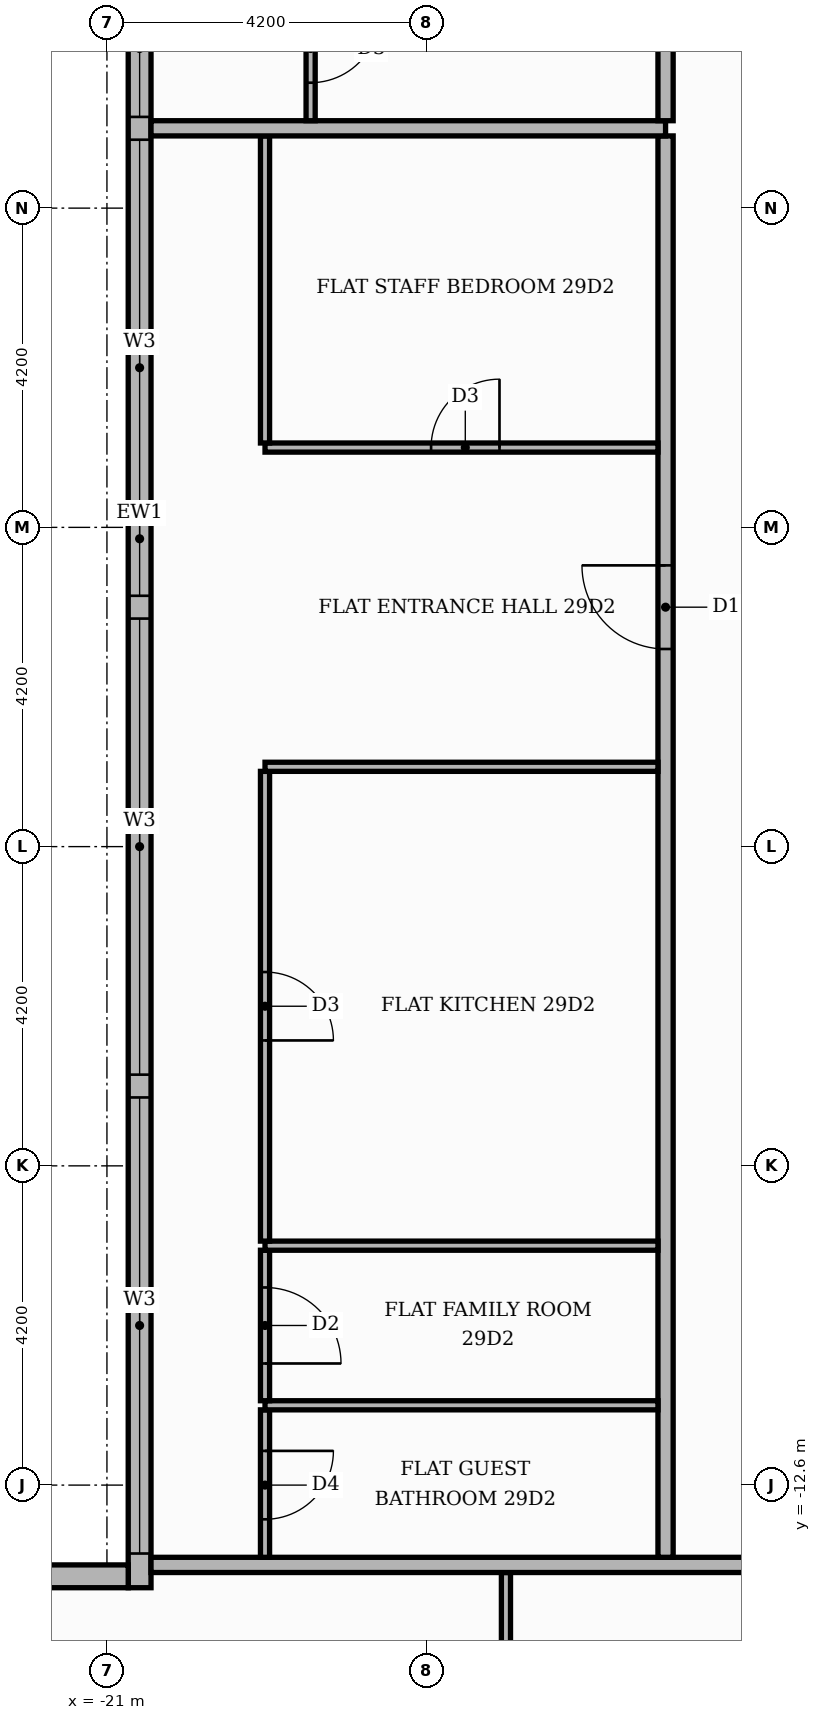
"""IFC4 building model, lengths in metres.
Left out: names, types, materials, properties, quantities, classifications, styles, units other than length and angle.
Written with IfcOpenShell. Run it as: python <this file> out.ifc"""

import sys

from ifc_helpers import new_model, si_unit, direction, frame, frame_2d, origin, place, context, subcontext, project, spatial, rectangle, extrude, element, fill, save


model = new_model("IFC4")
c1 = context("Model", 3, precision=1e-05, world=origin(), true_north=direction((0.0, 1.0)))
c2 = subcontext(c1, "Body", "Model", "MODEL_VIEW")
j1 = project(units=[si_unit("LENGTHUNIT", "METRE"), si_unit("PLANEANGLEUNIT", "RADIAN")], contexts=[c1])
p1 = place(None, origin())
s1 = spatial("IfcSite", under=j1, at=p1, CompositionType="ELEMENT")
p2 = place(p1, origin())
s2 = spatial("IfcBuilding", under=s1, at=p2, CompositionType="ELEMENT")
p3 = place(p2, frame((0.0, 0.0, 122.1)))
s3 = spatial("IfcBuildingStorey", under=s2, at=p3, CompositionType="ELEMENT", Elevation=122.1)
p4 = place(p3, frame((-20.57, 13.65, 0.0), z_axis=(0.0, 0.0, 1.0), x_axis=(0.0, -1.0, 0.0)))
e1 = element("IfcWall", 1, at=p4, inside=s3, PredefinedType="STANDARD", context=c2, shape_type="SweptSolid", body=[
    extrude(rectangle(XDim=27.6, YDim=0.3, at=frame_2d((13.8, 0.0))), origin(), (0.0, 0.0, 1.0), 3.4),
])
p5 = place(p4, frame((0.15, 0.0, 0.9)))
e2 = element("IfcOpeningElement", 2, at=p5, cuts=e1, PredefinedType="OPENING", context=c2, shape_type="SweptSolid", body=[
    extrude(rectangle(XDim=6.0, YDim=2.1, at=frame_2d((3.0, 1.05))), frame((0.0, 0.16, 0.0), z_axis=(0.0, -1.0, 0.0), x_axis=(1.0, 0.0, 0.0)), (0.0, 0.0, 1.0), 0.32),
])
p6 = place(p4, frame((6.45, 0.0, 0.9)))
e3 = element("IfcOpeningElement", 3, at=p6, cuts=e1, PredefinedType="OPENING", context=c2, shape_type="SweptSolid", body=[
    extrude(rectangle(XDim=1.8, YDim=2.1, at=frame_2d((0.9, 1.05))), frame((0.0, 0.16, 0.0), z_axis=(0.0, -1.0, 0.0), x_axis=(1.0, 0.0, 0.0)), (0.0, 0.0, 1.0), 0.32),
])
p7 = place(p4, frame((8.55, 0.0, 0.9)))
e4 = element("IfcOpeningElement", 4, at=p7, cuts=e1, PredefinedType="OPENING", context=c2, shape_type="SweptSolid", body=[
    extrude(rectangle(XDim=6.0, YDim=2.1, at=frame_2d((3.0, 1.05))), frame((0.0, 0.16, 0.0), z_axis=(0.0, -1.0, 0.0), x_axis=(1.0, 0.0, 0.0)), (0.0, 0.0, 1.0), 0.32),
])
p8 = place(p4, frame((14.85, 0.0, 0.9)))
e5 = element("IfcOpeningElement", 5, at=p8, cuts=e1, PredefinedType="OPENING", context=c2, shape_type="SweptSolid", body=[
    extrude(rectangle(XDim=6.0, YDim=2.1, at=frame_2d((3.0, 1.05))), frame((0.0, 0.16, 0.0), z_axis=(0.0, -1.0, 0.0), x_axis=(1.0, 0.0, 0.0)), (0.0, 0.0, 1.0), 0.32),
])
p9 = place(p4, frame((21.15, 0.0, 0.9)))
e6 = element("IfcOpeningElement", 6, at=p9, cuts=e1, PredefinedType="OPENING", context=c2, shape_type="SweptSolid", body=[
    extrude(rectangle(XDim=6.0, YDim=2.1, at=frame_2d((3.0, 1.05))), frame((0.0, 0.16, 0.0), z_axis=(0.0, -1.0, 0.0), x_axis=(1.0, 0.0, 0.0)), (0.0, 0.0, 1.0), 0.32),
])
p10 = place(p3, frame((-20.72, -13.8, 0.0), z_axis=(0.0, 0.0, 1.0), x_axis=(-1.0, 0.0, 0.0)))
e7 = element("IfcWall", 7, at=p10, inside=s3, PredefinedType="STANDARD", context=c2, shape_type="SweptSolid", body=[
    extrude(rectangle(XDim=5.0, YDim=0.3, at=frame_2d((2.5, 0.0))), origin(), (0.0, 0.0, 1.0), 3.4),
])
p11 = place(p10, frame((1.48, 0.0, 0.9)))
e8 = element("IfcOpeningElement", 8, at=p11, cuts=e7, PredefinedType="OPENING", context=c2, shape_type="SweptSolid", body=[
    extrude(rectangle(XDim=1.8, YDim=2.1, at=frame_2d((0.9, 1.05))), frame((0.0, 0.16, 0.0), z_axis=(0.0, -1.0, 0.0), x_axis=(1.0, 0.0, 0.0)), (0.0, 0.0, 1.0), 0.32),
])
p12 = place(p3, frame((-15.75, -20.66, 0.0), z_axis=(0.0, 0.0, 1.0), x_axis=(0.0, 1.0, 0.0)))
e9 = element("IfcWall", 9, at=p12, inside=s3, PredefinedType="PARTITIONING", context=c2, shape_type="SweptSolid", body=[
    extrude(rectangle(XDim=6.91, YDim=0.12, at=frame_2d((3.455, 0.0))), origin(), (0.0, 0.0, 1.0), 3.4),
])
p13 = place(p12, frame((2.975, 0.0, 0.0)))
e10 = element("IfcOpeningElement", 10, at=p13, cuts=e9, PredefinedType="OPENING", context=c2, shape_type="SweptSolid", body=[
    extrude(rectangle(XDim=1.0, YDim=2.1, at=frame_2d((0.5, 1.05))), frame((0.0, 0.07, 0.0), z_axis=(0.0, -1.0, 0.0), x_axis=(1.0, 0.0, 0.0)), (0.0, 0.0, 1.0), 0.14),
])
p14 = place(p3, frame((-20.42, -13.65, 0.0), z_axis=(0.0, 0.0, 1.0), x_axis=(1.0, 0.0, 0.0)))
e11 = element("IfcWall", 11, at=p14, inside=s3, PredefinedType="PARTITIONING", context=c2, shape_type="SweptSolid", body=[
    extrude(rectangle(XDim=34.07, YDim=0.2, at=frame_2d((17.035, 0.0))), origin(), (0.0, 0.0, 1.0), 3.4),
])
p15 = place(p14, frame((8.32, 0.0, 0.0)))
e12 = element("IfcOpeningElement", 12, at=p15, cuts=e11, PredefinedType="OPENING", context=c2, shape_type="SweptSolid", body=[
    extrude(rectangle(XDim=1.1, YDim=2.4, at=frame_2d((0.55, 1.2))), frame((0.0, 0.11, 0.0), z_axis=(0.0, -1.0, 0.0), x_axis=(1.0, 0.0, 0.0)), (0.0, 0.0, 1.0), 0.22),
])
p16 = place(p14, frame((16.72, 0.0, 0.0)))
e13 = element("IfcOpeningElement", 13, at=p16, cuts=e11, PredefinedType="OPENING", context=c2, shape_type="SweptSolid", body=[
    extrude(rectangle(XDim=1.1, YDim=2.4, at=frame_2d((0.55, 1.2))), frame((0.0, 0.11, 0.0), z_axis=(0.0, -1.0, 0.0), x_axis=(1.0, 0.0, 0.0)), (0.0, 0.0, 1.0), 0.22),
])
p17 = place(p3, frame((-18.92, -13.55, 0.0), z_axis=(0.0, 0.0, 1.0), x_axis=(0.0, 1.0, 0.0)))
e14 = element("IfcWall", 14, at=p17, inside=s3, PredefinedType="PARTITIONING", context=c2, shape_type="SweptSolid", body=[
    extrude(rectangle(XDim=1.94, YDim=0.12, at=frame_2d((0.97, 0.0))), origin(), (0.0, 0.0, 1.0), 3.4),
])
p18 = place(p17, frame((0.5, 0.0, 0.0)))
e15 = element("IfcOpeningElement", 15, at=p18, cuts=e14, PredefinedType="OPENING", context=c2, shape_type="SweptSolid", body=[
    extrude(rectangle(XDim=0.9, YDim=2.1, at=frame_2d((0.45, 1.05))), frame((0.0, 0.07, 0.0), z_axis=(0.0, -1.0, 0.0), x_axis=(1.0, 0.0, 0.0)), (0.0, 0.0, 1.0), 0.14),
])
p19 = place(p3, frame((-13.65, -13.55, 0.0), z_axis=(0.0, 0.0, 1.0), x_axis=(0.0, 1.0, 0.0)))
e16 = element("IfcWall", 16, at=p19, inside=s3, PredefinedType="PARTITIONING", context=c2, shape_type="SweptSolid", body=[
    extrude(rectangle(XDim=18.7, YDim=0.2, at=frame_2d((9.35, 0.0))), origin(), (0.0, 0.0, 1.0), 3.4),
])
p20 = place(p19, frame((11.95, 0.0, 0.0)))
e17 = element("IfcOpeningElement", 17, at=p20, cuts=e16, PredefinedType="OPENING", context=c2, shape_type="SweptSolid", body=[
    extrude(rectangle(XDim=1.1, YDim=2.4, at=frame_2d((0.55, 1.2))), frame((0.0, 0.11, 0.0), z_axis=(0.0, -1.0, 0.0), x_axis=(1.0, 0.0, 0.0)), (0.0, 0.0, 1.0), 0.22),
])
p21 = place(p3, frame((-18.92, -11.55, 0.0), z_axis=(0.0, 0.0, 1.0), x_axis=(1.0, 0.0, 0.0)))
e18 = element("IfcWall", 18, at=p21, inside=s3, PredefinedType="PARTITIONING", context=c2, shape_type="SweptSolid", body=[
    extrude(rectangle(XDim=5.17, YDim=0.12, at=frame_2d((2.585, 0.0))), origin(), (0.0, 0.0, 1.0), 3.4),
])
p22 = place(p3, frame((-18.92, -11.49, 0.0), z_axis=(0.0, 0.0, 1.0), x_axis=(0.0, 1.0, 0.0)))
e19 = element("IfcWall", 19, at=p22, inside=s3, PredefinedType="PARTITIONING", context=c2, shape_type="SweptSolid", body=[
    extrude(rectangle(XDim=1.98, YDim=0.12, at=frame_2d((0.99, 0.0))), origin(), (0.0, 0.0, 1.0), 3.4),
])
p23 = place(p22, frame((0.49, 0.0, 0.0)))
e20 = element("IfcOpeningElement", 20, at=p23, cuts=e19, PredefinedType="OPENING", context=c2, shape_type="SweptSolid", body=[
    extrude(rectangle(XDim=1.0, YDim=2.1, at=frame_2d((0.5, 1.05))), frame((0.0, 0.07, 0.0), z_axis=(0.0, -1.0, 0.0), x_axis=(1.0, 0.0, 0.0)), (0.0, 0.0, 1.0), 0.14),
])
p24 = place(p3, frame((-18.92, -9.45, 0.0), z_axis=(0.0, 0.0, 1.0), x_axis=(1.0, 0.0, 0.0)))
e21 = element("IfcWall", 21, at=p24, inside=s3, PredefinedType="PARTITIONING", context=c2, shape_type="SweptSolid", body=[
    extrude(rectangle(XDim=5.17, YDim=0.12, at=frame_2d((2.585, 0.0))), origin(), (0.0, 0.0, 1.0), 3.4),
])
p25 = place(p3, frame((-18.92, -9.39, 0.0), z_axis=(0.0, 0.0, 1.0), x_axis=(0.0, 1.0, 0.0)))
e22 = element("IfcWall", 22, at=p25, inside=s3, PredefinedType="PARTITIONING", context=c2, shape_type="SweptSolid", body=[
    extrude(rectangle(XDim=6.18, YDim=0.12, at=frame_2d((3.09, 0.0))), origin(), (0.0, 0.0, 1.0), 3.4),
])
p26 = place(p25, frame((2.64, 0.0, 0.0)))
e23 = element("IfcOpeningElement", 23, at=p26, cuts=e22, PredefinedType="OPENING", context=c2, shape_type="SweptSolid", body=[
    extrude(rectangle(XDim=0.9, YDim=2.1, at=frame_2d((0.45, 1.05))), frame((0.0, 0.07, 0.0), z_axis=(0.0, -1.0, 0.0), x_axis=(1.0, 0.0, 0.0)), (0.0, 0.0, 1.0), 0.14),
])
p27 = place(p3, frame((-18.92, -3.15, 0.0), z_axis=(0.0, 0.0, 1.0), x_axis=(1.0, 0.0, 0.0)))
e24 = element("IfcWall", 24, at=p27, inside=s3, PredefinedType="PARTITIONING", context=c2, shape_type="SweptSolid", body=[
    extrude(rectangle(XDim=5.17, YDim=0.12, at=frame_2d((2.585, 0.0))), origin(), (0.0, 0.0, 1.0), 3.4),
])
p28 = place(p3, frame((-18.92, 1.05, 0.0), z_axis=(0.0, 0.0, 1.0), x_axis=(1.0, 0.0, 0.0)))
e25 = element("IfcWall", 25, at=p28, inside=s3, PredefinedType="PARTITIONING", context=c2, shape_type="SweptSolid", body=[
    extrude(rectangle(XDim=5.17, YDim=0.12, at=frame_2d((2.585, 0.0))), origin(), (0.0, 0.0, 1.0), 3.4),
])
p29 = place(p28, frame((2.185, 0.0, 0.0)))
e26 = element("IfcOpeningElement", 26, at=p29, cuts=e25, PredefinedType="OPENING", context=c2, shape_type="SweptSolid", body=[
    extrude(rectangle(XDim=0.9, YDim=2.1, at=frame_2d((0.45, 1.05))), frame((0.0, 0.07, 0.0), z_axis=(0.0, -1.0, 0.0), x_axis=(1.0, 0.0, 0.0)), (0.0, 0.0, 1.0), 0.14),
])
p30 = place(p3, frame((-18.92, 1.11, 0.0), z_axis=(0.0, 0.0, 1.0), x_axis=(0.0, 1.0, 0.0)))
e27 = element("IfcWall", 27, at=p30, inside=s3, PredefinedType="PARTITIONING", context=c2, shape_type="SweptSolid", body=[
    extrude(rectangle(XDim=4.04, YDim=0.12, at=frame_2d((2.02, 0.0))), origin(), (0.0, 0.0, 1.0), 3.4),
])
p31 = place(p3, frame((-20.42, 5.25, 0.0), z_axis=(0.0, 0.0, 1.0), x_axis=(1.0, 0.0, 0.0)))
e28 = element("IfcWall", 28, at=p31, inside=s3, PredefinedType="PARTITIONING", context=c2, shape_type="SweptSolid", body=[
    extrude(rectangle(XDim=6.77, YDim=0.2, at=frame_2d((3.385, 0.0))), origin(), (0.0, 0.0, 1.0), 3.4),
])
p32 = place(p3, frame((-18.32, 5.35, 0.0), z_axis=(0.0, 0.0, 1.0), x_axis=(0.0, 1.0, 0.0)))
e29 = element("IfcWall", 29, at=p32, inside=s3, PredefinedType="PARTITIONING", context=c2, shape_type="SweptSolid", body=[
    extrude(rectangle(XDim=1.94, YDim=0.12, at=frame_2d((0.97, 0.0))), origin(), (0.0, 0.0, 1.0), 3.4),
])
p33 = place(p32, frame((0.5, 0.0, 0.0)))
e30 = element("IfcOpeningElement", 30, at=p33, cuts=e29, PredefinedType="OPENING", context=c2, shape_type="SweptSolid", body=[
    extrude(rectangle(XDim=0.9, YDim=2.1, at=frame_2d((0.45, 1.05))), frame((0.0, 0.07, 0.0), z_axis=(0.0, -1.0, 0.0), x_axis=(1.0, 0.0, 0.0)), (0.0, 0.0, 1.0), 0.14),
])
p34 = place(p3, frame((-13.65, 5.35, 0.0), z_axis=(0.0, 0.0, 1.0), x_axis=(0.0, 1.0, 0.0)))
e31 = element("IfcWall", 31, at=p34, inside=s3, PredefinedType="PARTITIONING", context=c2, shape_type="SweptSolid", body=[
    extrude(rectangle(XDim=8.2, YDim=0.2, at=frame_2d((4.1, 0.0))), origin(), (0.0, 0.0, 1.0), 3.4),
])
p35 = place(p34, frame((5.65, 0.0, 0.0)))
e32 = element("IfcOpeningElement", 32, at=p35, cuts=e31, PredefinedType="OPENING", context=c2, shape_type="SweptSolid", body=[
    extrude(rectangle(XDim=1.1, YDim=2.4, at=frame_2d((0.55, 1.2))), frame((0.0, 0.11, 0.0), z_axis=(0.0, -1.0, 0.0), x_axis=(1.0, 0.0, 0.0)), (0.0, 0.0, 1.0), 0.22),
])
p36 = place(p6, origin())
e33 = element("IfcWindow", 33, at=p36, inside=s3, PartitioningType="SINGLE_PANEL", PredefinedType="WINDOW", context=c2, shape_type="SweptSolid", body=[
    extrude(rectangle(XDim=1.8, YDim=2.1, at=frame_2d((0.9, 1.05))), frame((0.0, 0.03, 0.0), z_axis=(0.0, -1.0, 0.0), x_axis=(1.0, 0.0, 0.0)), (0.0, 0.0, 1.0), 0.06),
])
fill(e3, e33)
p37 = place(p7, origin())
e34 = element("IfcWindow", 34, at=p37, inside=s3, PartitioningType="SINGLE_PANEL", PredefinedType="WINDOW", context=c2, shape_type="SweptSolid", body=[
    extrude(rectangle(XDim=6.0, YDim=2.1, at=frame_2d((3.0, 1.05))), frame((0.0, 0.03, 0.0), z_axis=(0.0, -1.0, 0.0), x_axis=(1.0, 0.0, 0.0)), (0.0, 0.0, 1.0), 0.06),
])
fill(e4, e34)
p38 = place(p8, origin())
e35 = element("IfcWindow", 35, at=p38, inside=s3, PartitioningType="SINGLE_PANEL", PredefinedType="WINDOW", context=c2, shape_type="SweptSolid", body=[
    extrude(rectangle(XDim=6.0, YDim=2.1, at=frame_2d((3.0, 1.05))), frame((0.0, 0.03, 0.0), z_axis=(0.0, -1.0, 0.0), x_axis=(1.0, 0.0, 0.0)), (0.0, 0.0, 1.0), 0.06),
])
fill(e5, e35)
p39 = place(p9, origin())
e36 = element("IfcWindow", 36, at=p39, inside=s3, PartitioningType="SINGLE_PANEL", PredefinedType="WINDOW", context=c2, shape_type="SweptSolid", body=[
    extrude(rectangle(XDim=6.0, YDim=2.1, at=frame_2d((3.0, 1.05))), frame((0.0, 0.03, 0.0), z_axis=(0.0, -1.0, 0.0), x_axis=(1.0, 0.0, 0.0)), (0.0, 0.0, 1.0), 0.06),
])
fill(e6, e36)
p40 = place(p33, frame((0.9, 0.0, 0.0), z_axis=(0.0, 0.0, 1.0), x_axis=(-1.0, 0.0, 0.0)))
e37 = element("IfcDoor", 37, at=p40, inside=s3, OperationType="SINGLE_SWING_RIGHT", PredefinedType="DOOR", context=c2, shape_type="SweptSolid", body=[
    extrude(rectangle(XDim=0.9, YDim=2.1, at=frame_2d((0.45, 1.05))), frame((0.0, 0.025, 0.0), z_axis=(0.0, -1.0, 0.0), x_axis=(1.0, 0.0, 0.0)), (0.0, 0.0, 1.0), 0.05),
])
fill(e30, e37)
p41 = place(p20, origin())
e38 = element("IfcDoor", 38, at=p41, inside=s3, OperationType="SINGLE_SWING_RIGHT", PredefinedType="DOOR", context=c2, shape_type="SweptSolid", body=[
    extrude(rectangle(XDim=1.1, YDim=2.4, at=frame_2d((0.55, 1.2))), frame((0.0, 0.025, 0.0), z_axis=(0.0, -1.0, 0.0), x_axis=(1.0, 0.0, 0.0)), (0.0, 0.0, 1.0), 0.05),
])
fill(e17, e38)
p42 = place(p29, origin())
e39 = element("IfcDoor", 39, at=p42, inside=s3, OperationType="SINGLE_SWING_RIGHT", PredefinedType="DOOR", context=c2, shape_type="SweptSolid", body=[
    extrude(rectangle(XDim=0.9, YDim=2.1, at=frame_2d((0.45, 1.05))), frame((0.0, 0.025, 0.0), z_axis=(0.0, -1.0, 0.0), x_axis=(1.0, 0.0, 0.0)), (0.0, 0.0, 1.0), 0.05),
])
fill(e26, e39)
p43 = place(p26, frame((0.9, 0.0, 0.0), z_axis=(0.0, 0.0, 1.0), x_axis=(-1.0, 0.0, 0.0)))
e40 = element("IfcDoor", 40, at=p43, inside=s3, OperationType="SINGLE_SWING_LEFT", PredefinedType="DOOR", context=c2, shape_type="SweptSolid", body=[
    extrude(rectangle(XDim=0.9, YDim=2.1, at=frame_2d((0.45, 1.05))), frame((0.0, 0.025, 0.0), z_axis=(0.0, -1.0, 0.0), x_axis=(1.0, 0.0, 0.0)), (0.0, 0.0, 1.0), 0.05),
])
fill(e23, e40)
p44 = place(p23, frame((1.0, 0.0, 0.0), z_axis=(0.0, 0.0, 1.0), x_axis=(-1.0, 0.0, 0.0)))
e41 = element("IfcDoor", 41, at=p44, inside=s3, OperationType="SINGLE_SWING_LEFT", PredefinedType="DOOR", context=c2, shape_type="SweptSolid", body=[
    extrude(rectangle(XDim=1.0, YDim=2.1, at=frame_2d((0.5, 1.05))), frame((0.0, 0.025, 0.0), z_axis=(0.0, -1.0, 0.0), x_axis=(1.0, 0.0, 0.0)), (0.0, 0.0, 1.0), 0.05),
])
fill(e20, e41)
p45 = place(p18, frame((0.9, 0.0, 0.0), z_axis=(0.0, 0.0, 1.0), x_axis=(-1.0, 0.0, 0.0)))
e42 = element("IfcDoor", 42, at=p45, inside=s3, OperationType="SINGLE_SWING_RIGHT", PredefinedType="DOOR", context=c2, shape_type="SweptSolid", body=[
    extrude(rectangle(XDim=0.9, YDim=2.1, at=frame_2d((0.45, 1.05))), frame((0.0, 0.025, 0.0), z_axis=(0.0, -1.0, 0.0), x_axis=(1.0, 0.0, 0.0)), (0.0, 0.0, 1.0), 0.05),
])
fill(e15, e42)
save(model, sys.argv[1])
